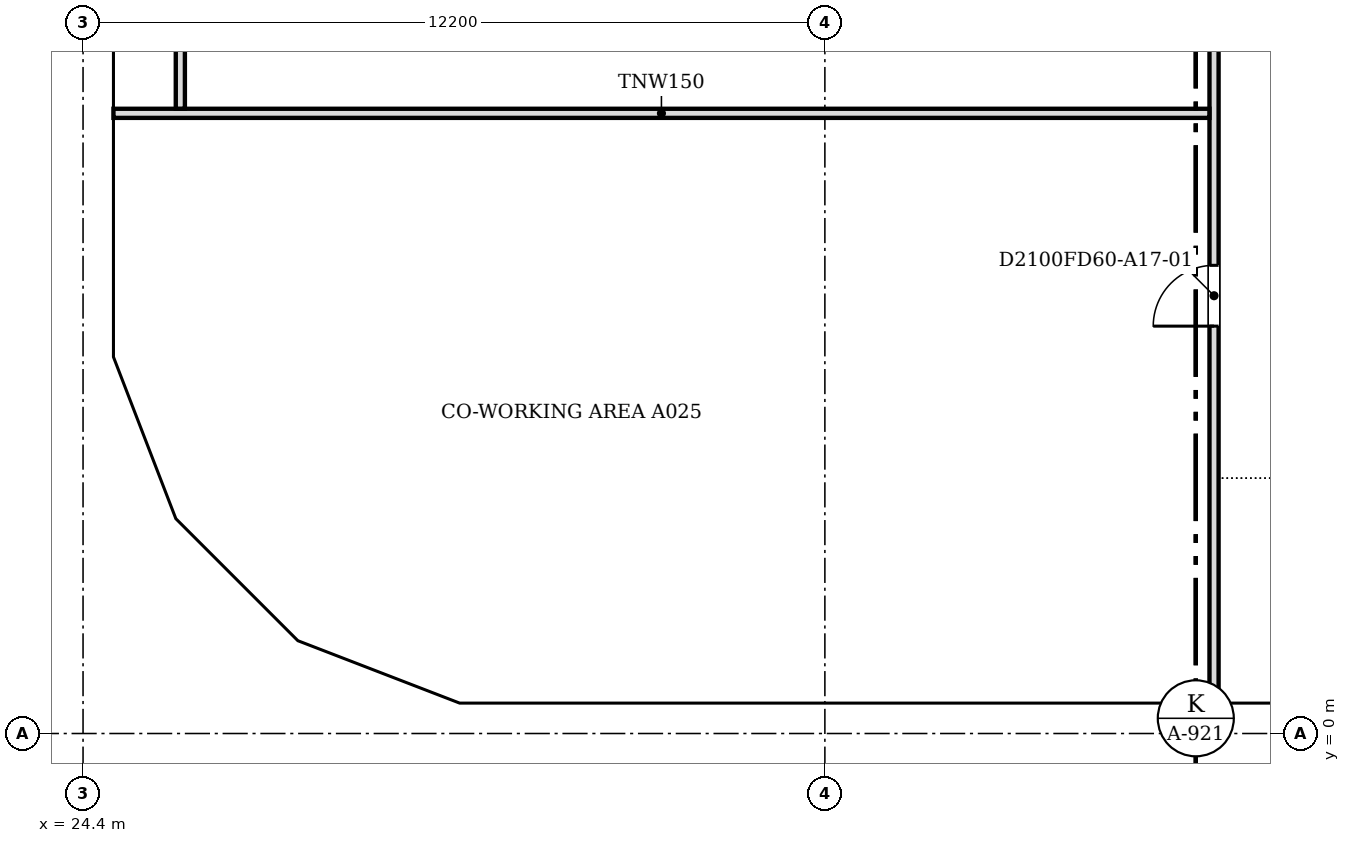
"""IFC4 building model, lengths in metres.
Left out: names, types, materials, properties, quantities, classifications, styles, units other than length and angle.
Written with IfcOpenShell. Run it as: python <this file> out.ifc"""

import sys

from ifc_helpers import new_model, si_unit, direction, frame, frame_2d, origin, place, context, subcontext, project, spatial, polyline, rectangle, outline, extrude, faceted_brep, source, transform, mapped, element, fill, save


model = new_model("IFC4")
c1 = context("Model", 3, precision=1e-05, world=origin(), true_north=direction((0.0, 1.0)))
c2 = subcontext(c1, "Body", "Model", "MODEL_VIEW")
j1 = project(units=[si_unit("LENGTHUNIT", "METRE"), si_unit("PLANEANGLEUNIT", "RADIAN")], contexts=[c1])
p1 = place(None, origin())
s1 = spatial("IfcSite", under=j1, at=p1, CompositionType="ELEMENT")
p2 = place(p1, origin())
s2 = spatial("IfcBuilding", under=s1, at=p2, CompositionType="ELEMENT")
p3 = place(p2, frame((0.0, 0.0, 189.6)))
s3 = spatial("IfcBuildingStorey", under=s2, at=p3, CompositionType="ELEMENT", Elevation=189.6)
m1 = source(origin(), c2, "Body", "Brep", [
    faceted_brep([(3.003, -0.25, 0.0), (6.053, -0.25, 3.8), (3.003, -0.25, 7.6), (0.0, -0.25, 3.8), (0.047, 0.25, 3.859), (3.003, 0.25, 7.6), (6.053, 0.25, 3.8), (3.003, 0.25, 0.0), (0.047, 0.25, 3.741), (0.0, 0.0, 3.8)], [[[0, 1, 2, 3]], [[4, 5, 6, 7, 8]], [[7, 6, 1, 0]], [[6, 5, 2, 1]], [[5, 4, 9, 3, 2]], [[8, 7, 0, 3, 9]], [[8, 9, 4]]]),
])
p4 = place(p3, frame((30.547, 0.25, -3.8), z_axis=(0.0, 0.0, 1.0), x_axis=(1.0, 0.0, 0.0)))
e1 = element("IfcWall", 1, at=p4, inside=s3, PredefinedType="SOLIDWALL", context=c2, shape_type="MappedRepresentation", body=[
    mapped(m1, transform((0.0, 0.0, 0.0), scale=1.0)),
])
m2 = source(origin(), c2, "Body", "SweptSolid", [
    extrude(outline(polyline([(3.005, 0.401), (5.733, 3.8), (3.005, 7.199), (0.319, 3.8), (3.005, 0.401)])), frame((0.0, 0.26, 0.0), z_axis=(0.0, -1.0, 0.0), x_axis=(1.0, 0.0, 0.0)), (0.0, 0.0, 1.0), 0.52),
])
p5 = place(p4, origin())
e2 = element("IfcOpeningElement", 2, at=p5, cuts=e1, PredefinedType="OPENING", context=c2, shape_type="MappedRepresentation", body=[
    mapped(m2, transform((0.0, 0.0, 0.0), scale=1.0)),
])
m3 = source(origin(), c2, "Body", "Brep", [
    faceted_brep([(3.05, -0.25, 0.0), (6.1, -0.25, 3.8), (6.1, -0.25, 3.8), (3.05, -0.25, 7.6), (0.0, -0.25, 3.8), (0.0, 0.25, 3.8), (3.05, 0.25, 7.6), (6.1, 0.25, 3.8), (6.1, 0.25, 3.8), (3.05, 0.25, 0.0)], [[[0, 1, 2, 3, 4]], [[5, 6, 7, 8, 9]], [[9, 8, 1, 0]], [[7, 6, 3, 2]], [[6, 5, 4, 3]], [[5, 9, 0, 4]], [[1, 8, 7, 2]]]),
])
p6 = place(p3, frame((36.6, 0.25, -3.8), z_axis=(0.0, 0.0, 1.0), x_axis=(1.0, 0.0, 0.0)))
e3 = element("IfcWall", 3, at=p6, inside=s3, PredefinedType="SOLIDWALL", context=c2, shape_type="MappedRepresentation", body=[
    mapped(m3, transform((0.0, 0.0, 0.0), scale=1.0)),
])
m4 = source(origin(), c2, "Body", "SweptSolid", [
    extrude(outline(polyline([(3.05, 0.399), (5.78, 3.8), (3.05, 7.2), (0.321, 3.8), (3.05, 0.399)])), frame((0.0, 0.26, 0.0), z_axis=(0.0, -1.0, 0.0), x_axis=(1.0, 0.0, 0.0)), (0.0, 0.0, 1.0), 0.52),
])
p7 = place(p6, origin())
e4 = element("IfcOpeningElement", 4, at=p7, cuts=e3, PredefinedType="OPENING", context=c2, shape_type="MappedRepresentation", body=[
    mapped(m4, transform((0.0, 0.0, 0.0), scale=1.0)),
])
m5 = source(origin(), c2, "Body", "SweptSolid", [
    extrude(outline(polyline([(3.05, 0.0), (6.1, 3.8), (3.05, 7.6), (0.0, 3.8), (3.05, 0.0)])), frame((0.0, 0.25, 0.0), z_axis=(0.0, -1.0, 0.0), x_axis=(1.0, 0.0, 0.0)), (0.0, 0.0, 1.0), 0.5),
])
p8 = place(p3, frame((42.7, 0.25, -3.8), z_axis=(0.0, 0.0, 1.0), x_axis=(1.0, 0.0, 0.0)))
e5 = element("IfcWall", 5, at=p8, inside=s3, PredefinedType="SOLIDWALL", context=c2, shape_type="MappedRepresentation", body=[
    mapped(m5, transform((0.0, 0.0, 0.0), scale=1.0)),
])
p9 = place(p8, origin())
e6 = element("IfcOpeningElement", 6, at=p9, cuts=e5, PredefinedType="OPENING", context=c2, shape_type="MappedRepresentation", body=[
    mapped(m4, transform((0.0, 0.0, 0.0), scale=1.0)),
])
m6 = source(origin(), c2, "Body", "Brep", [
    faceted_brep([(0.093, -0.25, 0.057), (3.143, -0.25, 3.8), (0.093, -0.25, 7.543), (0.0, 0.25, 7.544), (0.047, 0.25, 7.6), (3.143, 0.25, 3.8), (0.047, 0.25, 0.0), (0.0, 0.25, 0.056), (0.047, 0.0, 0.0), (0.047, 0.0, 7.6)], [[[0, 1, 2]], [[3, 4, 5, 6, 7]], [[6, 5, 1, 0, 8]], [[5, 4, 9, 2, 1]], [[4, 3, 9]], [[7, 6, 8]], [[7, 8, 0, 2, 9, 3]]]),
])
p10 = place(p3, frame((24.65, 12.293, -3.8), z_axis=(0.0, 0.0, 1.0), x_axis=(0.0, -1.0, 0.0)))
e7 = element("IfcWall", 7, at=p10, inside=s3, PredefinedType="SOLIDWALL", context=c2, shape_type="MappedRepresentation", body=[
    mapped(m6, transform((0.0, 0.0, 0.0), scale=1.0)),
])
m7 = source(origin(), c2, "Body", "SweptSolid", [
    extrude(outline(polyline([(0.247, 0.641), (2.821, 3.8), (0.247, 6.959), (0.247, 0.641)])), frame((0.0, 0.26, 0.0), z_axis=(0.0, -1.0, 0.0), x_axis=(1.0, 0.0, 0.0)), (0.0, 0.0, 1.0), 0.52),
])
p11 = place(p10, origin())
e8 = element("IfcOpeningElement", 8, at=p11, cuts=e7, PredefinedType="OPENING", context=c2, shape_type="MappedRepresentation", body=[
    mapped(m7, transform((0.0, 0.0, 0.0), scale=1.0)),
])
m8 = source(origin(), c2, "Body", "Brep", [
    faceted_brep([(3.003, -0.25, 0.0), (3.05, -0.25, 0.06), (3.05, -0.25, 7.54), (3.003, -0.25, 7.6), (0.0, -0.25, 3.8), (0.0, 0.25, 3.8), (2.957, 0.25, 7.541), (2.957, 0.25, 0.059), (3.003, 0.0, 0.0), (3.003, 0.0, 7.6)], [[[0, 1, 2, 3, 4]], [[5, 6, 7]], [[1, 0, 8]], [[9, 3, 2]], [[6, 5, 4, 3, 9]], [[5, 7, 8, 0, 4]], [[1, 8, 7, 6, 9, 2]]]),
])
p12 = place(p3, frame((24.65, 9.15, -3.8), z_axis=(0.0, 0.0, 1.0), x_axis=(0.0, -1.0, 0.0)))
e9 = element("IfcWall", 9, at=p12, inside=s3, PredefinedType="SOLIDWALL", context=c2, shape_type="MappedRepresentation", body=[
    mapped(m8, transform((0.0, 0.0, 0.0), scale=1.0)),
])
m9 = source(origin(), c2, "Body", "SweptSolid", [
    extrude(outline(polyline([(2.803, 6.944), (0.319, 3.8), (2.803, 0.656), (2.803, 6.944)])), frame((0.0, 0.26, 0.0), z_axis=(0.0, -1.0, 0.0), x_axis=(1.0, 0.0, 0.0)), (0.0, 0.0, 1.0), 0.52),
])
p13 = place(p12, origin())
e10 = element("IfcOpeningElement", 10, at=p13, cuts=e9, PredefinedType="OPENING", context=c2, shape_type="MappedRepresentation", body=[
    mapped(m9, transform((0.0, 0.0, 0.0), scale=1.0)),
])
m10 = source(origin(), c2, "Body", "Brep", [
    faceted_brep([(0.047, -0.25, 0.0), (2.997, -0.25, 3.8), (0.047, -0.25, 7.6), (0.0, -0.25, 7.541), (0.0, -0.25, 0.059), (0.093, 0.25, 7.54), (2.944, 0.25, 3.868), (2.944, 0.25, 3.732), (0.093, 0.25, 0.06), (2.997, 0.0, 3.8), (0.047, 0.0, 0.0), (0.047, 0.0, 7.6)], [[[0, 1, 2, 3, 4]], [[5, 6, 7, 8]], [[8, 7, 9, 1, 0, 10]], [[6, 5, 11, 2, 1, 9]], [[3, 2, 11]], [[10, 0, 4]], [[8, 10, 4, 3, 11, 5]], [[7, 6, 9]]]),
])
p14 = place(p3, frame((24.633, 6.19, -3.8), z_axis=(0.0, 0.0, 1.0), x_axis=(0.359901446078, -0.932990326376, 0.0)))
e11 = element("IfcWall", 11, at=p14, inside=s3, PredefinedType="SOLIDWALL", context=c2, shape_type="MappedRepresentation", body=[
    mapped(m10, transform((0.0, 0.0, 0.0), scale=1.0)),
])
m11 = source(origin(), c2, "Body", "SweptSolid", [
    extrude(outline(polyline([(0.247, 0.665), (2.681, 3.8), (0.247, 6.935), (0.247, 0.665)])), frame((0.0, 0.26, 0.0), z_axis=(0.0, -1.0, 0.0), x_axis=(1.0, 0.0, 0.0)), (0.0, 0.0, 1.0), 0.52),
])
p15 = place(p14, origin())
e12 = element("IfcOpeningElement", 12, at=p15, cuts=e11, PredefinedType="OPENING", context=c2, shape_type="MappedRepresentation", body=[
    mapped(m11, transform((0.0, 0.0, 0.0), scale=1.0)),
])
m12 = source(origin(), c2, "Body", "Brep", [
    faceted_brep([(2.944, -0.25, 0.0), (2.997, -0.25, 0.068), (2.997, -0.25, 7.532), (2.944, -0.25, 7.6), (0.0, -0.25, 3.8), (0.053, 0.25, 3.868), (2.891, 0.25, 7.532), (2.891, 0.25, 0.068), (0.053, 0.25, 3.732), (2.944, 0.0, 0.0), (2.944, 0.0, 7.6), (0.0, 0.0, 3.8)], [[[0, 1, 2, 3, 4]], [[5, 6, 7, 8]], [[1, 0, 9]], [[10, 3, 2]], [[6, 5, 11, 4, 3, 10]], [[8, 7, 9, 0, 4, 11]], [[8, 11, 5]], [[1, 9, 7, 6, 10, 2]]]),
])
p16 = place(p3, frame((25.712, 3.394, -3.8), z_axis=(0.0, 0.0, 1.0), x_axis=(0.707066050402, -0.707147509625, 0.0)))
e13 = element("IfcWall", 13, at=p16, inside=s3, PredefinedType="SOLIDWALL", context=c2, shape_type="MappedRepresentation", body=[
    mapped(m12, transform((0.0, 0.0, 0.0), scale=1.0)),
])
m13 = source(origin(), c2, "Body", "SweptSolid", [
    extrude(outline(polyline([(2.744, 6.934), (0.316, 3.8), (2.744, 0.666), (2.744, 6.934)])), frame((0.0, 0.26, 0.0), z_axis=(0.0, -1.0, 0.0), x_axis=(1.0, 0.0, 0.0)), (0.0, 0.0, 1.0), 0.52),
])
p17 = place(p16, origin())
e14 = element("IfcOpeningElement", 14, at=p17, cuts=e13, PredefinedType="OPENING", context=c2, shape_type="MappedRepresentation", body=[
    mapped(m13, transform((0.0, 0.0, 0.0), scale=1.0)),
])
m14 = source(origin(), c2, "Body", "Brep", [
    faceted_brep([(0.053, -0.25, 0.0), (3.003, -0.25, 3.8), (0.053, -0.25, 7.6), (0.0, -0.25, 7.531), (0.0, -0.25, 0.068), (0.106, 0.25, 7.532), (2.957, 0.25, 3.86), (2.957, 0.25, 3.74), (0.106, 0.25, 0.068), (3.003, 0.0, 3.8), (0.053, 0.0, 0.0), (0.053, 0.0, 7.6)], [[[0, 1, 2, 3, 4]], [[5, 6, 7, 8]], [[8, 7, 9, 1, 0, 10]], [[6, 5, 11, 2, 1, 9]], [[3, 2, 11]], [[10, 0, 4]], [[8, 10, 4, 3, 11, 5]], [[7, 6, 9]]]),
])
p18 = place(p3, frame((27.744, 1.331, -3.8), z_axis=(0.0, 0.0, 1.0), x_axis=(0.932970071518, -0.359953949349, 0.0)))
e15 = element("IfcWall", 15, at=p18, inside=s3, PredefinedType="SOLIDWALL", context=c2, shape_type="MappedRepresentation", body=[
    mapped(m14, transform((0.0, 0.0, 0.0), scale=1.0)),
])
m15 = source(origin(), c2, "Body", "SweptSolid", [
    extrude(outline(polyline([(0.253, 0.665), (2.687, 3.8), (0.253, 6.935), (0.253, 0.665)])), frame((0.0, 0.26, 0.0), z_axis=(0.0, -1.0, 0.0), x_axis=(1.0, 0.0, 0.0)), (0.0, 0.0, 1.0), 0.52),
])
p19 = place(p18, origin())
e16 = element("IfcOpeningElement", 16, at=p19, cuts=e15, PredefinedType="OPENING", context=c2, shape_type="MappedRepresentation", body=[
    mapped(m15, transform((0.0, 0.0, 0.0), scale=1.0)),
])
m16 = source(origin(), c2, "Body", "Brep", [
    faceted_brep([(0.047, -0.25, 0.0), (3.05, -0.25, 3.8), (0.0, -0.25, 3.8), (0.0, -0.25, 0.06), (0.093, 0.25, 3.8), (3.05, 0.25, 3.8), (0.093, 0.25, 0.059), (0.047, 0.0, 0.0)], [[[0, 1, 2, 3]], [[4, 5, 6]], [[6, 5, 1, 0, 7]], [[5, 4, 2, 1]], [[7, 0, 3]], [[6, 7, 3, 2, 4]]]),
])
p20 = place(p3, frame((30.5, 0.25, 0.0), z_axis=(0.0, 0.0, 1.0), x_axis=(1.0, 0.0, 0.0)))
e17 = element("IfcWall", 17, at=p20, inside=s3, PredefinedType="SOLIDWALL", context=c2, shape_type="MappedRepresentation", body=[
    mapped(m16, transform((0.0, 0.0, 0.0), scale=1.0)),
])
m17 = source(origin(), c2, "Body", "SweptSolid", [
    extrude(outline(polyline([(0.247, 0.656), (2.534, 3.55), (0.247, 3.55), (0.247, 0.656)])), frame((0.0, 0.26, 0.0), z_axis=(0.0, -1.0, 0.0), x_axis=(1.0, 0.0, 0.0)), (0.0, 0.0, 1.0), 0.52),
])
p21 = place(p20, origin())
e18 = element("IfcOpeningElement", 18, at=p21, cuts=e17, PredefinedType="OPENING", context=c2, shape_type="MappedRepresentation", body=[
    mapped(m17, transform((0.0, 0.0, 0.0), scale=1.0)),
])
m18 = source(origin(), c2, "Body", "Brep", [
    faceted_brep([(2.95, -0.25, 0.0), (2.997, -0.25, 0.059), (2.997, -0.25, 3.8), (0.0, -0.25, 3.8), (0.053, 0.25, 3.8), (2.904, 0.25, 3.8), (2.904, 0.25, 0.06), (0.053, 0.25, 3.732), (2.95, 0.0, 0.0), (0.0, 0.0, 3.8)], [[[0, 1, 2, 3]], [[4, 5, 6, 7]], [[1, 0, 8]], [[5, 4, 9, 3, 2]], [[7, 6, 8, 0, 3, 9]], [[7, 9, 4]], [[1, 8, 6, 5, 2]]]),
])
p22 = place(p3, frame((27.794, 1.312, 0.0), z_axis=(0.0, 0.0, 1.0), x_axis=(0.932973525033, -0.359944998003, 0.0)))
e19 = element("IfcWall", 19, at=p22, inside=s3, PredefinedType="SOLIDWALL", context=c2, shape_type="MappedRepresentation", body=[
    mapped(m18, transform((0.0, 0.0, 0.0), scale=1.0)),
])
m19 = source(origin(), c2, "Body", "SweptSolid", [
    extrude(outline(polyline([(2.75, 3.55), (0.511, 3.55), (2.75, 0.665), (2.75, 3.55)])), frame((0.0, 0.26, 0.0), z_axis=(0.0, -1.0, 0.0), x_axis=(1.0, 0.0, 0.0)), (0.0, 0.0, 1.0), 0.52),
])
p23 = place(p22, origin())
e20 = element("IfcOpeningElement", 20, at=p23, cuts=e19, PredefinedType="OPENING", context=c2, shape_type="MappedRepresentation", body=[
    mapped(m19, transform((0.0, 0.0, 0.0), scale=1.0)),
])
m20 = source(origin(), c2, "Body", "Brep", [
    faceted_brep([(3.05, -0.25, 0.0), (6.1, -0.25, 3.8), (6.1, -0.25, 3.8), (0.0, -0.25, 3.8), (0.0, 0.25, 3.8), (6.1, 0.25, 3.8), (6.1, 0.25, 3.8), (3.05, 0.25, 0.0)], [[[0, 1, 2, 3]], [[4, 5, 6, 7]], [[7, 6, 1, 0]], [[5, 4, 3, 2]], [[4, 7, 0, 3]], [[1, 6, 5, 2]]]),
])
p24 = place(p3, frame((33.55, 0.25, 0.0), z_axis=(0.0, 0.0, 1.0), x_axis=(1.0, 0.0, 0.0)))
e21 = element("IfcWall", 21, at=p24, inside=s3, PredefinedType="SOLIDWALL", context=c2, shape_type="MappedRepresentation", body=[
    mapped(m20, transform((0.0, 0.0, 0.0), scale=1.0)),
])
m21 = source(origin(), c2, "Body", "SweptSolid", [
    extrude(outline(polyline([(3.05, 0.399), (5.579, 3.55), (0.521, 3.55), (3.05, 0.399)])), frame((0.0, 0.26, 0.0), z_axis=(0.0, -1.0, 0.0), x_axis=(1.0, 0.0, 0.0)), (0.0, 0.0, 1.0), 0.52),
])
p25 = place(p24, origin())
e22 = element("IfcOpeningElement", 22, at=p25, cuts=e21, PredefinedType="OPENING", context=c2, shape_type="MappedRepresentation", body=[
    mapped(m21, transform((0.0, 0.0, 0.0), scale=1.0)),
])
m22 = source(origin(), c2, "Body", "SweptSolid", [
    extrude(outline(polyline([(3.05, 0.0), (6.1, 3.8), (0.0, 3.8), (3.05, 0.0)])), frame((0.0, 0.25, 0.0), z_axis=(0.0, -1.0, 0.0), x_axis=(1.0, 0.0, 0.0)), (0.0, 0.0, 1.0), 0.5),
])
p26 = place(p3, frame((39.65, 0.25, 0.0), z_axis=(0.0, 0.0, 1.0), x_axis=(1.0, 0.0, 0.0)))
e23 = element("IfcWall", 23, at=p26, inside=s3, PredefinedType="SOLIDWALL", context=c2, shape_type="MappedRepresentation", body=[
    mapped(m22, transform((0.0, 0.0, 0.0), scale=1.0)),
])
p27 = place(p26, origin())
e24 = element("IfcOpeningElement", 24, at=p27, cuts=e23, PredefinedType="OPENING", context=c2, shape_type="MappedRepresentation", body=[
    mapped(m21, transform((0.0, 0.0, 0.0), scale=1.0)),
])
m23 = source(origin(), c2, "Body", "Brep", [
    faceted_brep([(3.096, -0.25, 0.0), (6.1, -0.25, 3.8), (0.047, -0.25, 3.8), (0.047, -0.25, 3.743), (0.0, 0.25, 3.8), (6.053, 0.25, 3.8), (6.053, 0.25, 3.741), (3.096, 0.25, 0.0), (6.1, -0.0, 3.8), (0.0, 0.0, 3.8)], [[[0, 1, 2, 3]], [[4, 5, 6, 7]], [[7, 6, 8, 1, 0]], [[5, 4, 9, 2, 1, 8]], [[4, 7, 0, 3, 9]], [[3, 2, 9]], [[6, 5, 8]]]),
])
p28 = place(p3, frame((24.65, 12.247, 0.0), z_axis=(0.0, 0.0, 1.0), x_axis=(0.0, -1.0, 0.0)))
e25 = element("IfcWall", 25, at=p28, inside=s3, PredefinedType="SOLIDWALL", context=c2, shape_type="MappedRepresentation", body=[
    mapped(m23, transform((0.0, 0.0, 0.0), scale=1.0)),
])
m24 = source(origin(), c2, "Body", "SweptSolid", [
    extrude(outline(polyline([(3.094, 0.399), (5.584, 3.55), (0.526, 3.55), (3.094, 0.399)])), frame((0.0, 0.26, 0.0), z_axis=(0.0, -1.0, 0.0), x_axis=(1.0, 0.0, 0.0)), (0.0, 0.0, 1.0), 0.52),
])
p29 = place(p28, origin())
e26 = element("IfcOpeningElement", 26, at=p29, cuts=e25, PredefinedType="OPENING", context=c2, shape_type="MappedRepresentation", body=[
    mapped(m24, transform((0.0, 0.0, 0.0), scale=1.0)),
])
m25 = source(origin(), c2, "Body", "Brep", [
    faceted_brep([(2.95, -0.25, 0.0), (3.003, -0.25, 0.068), (3.003, -0.25, 3.8), (0.0, -0.25, 3.8), (0.047, 0.25, 3.8), (2.898, 0.25, 3.8), (2.898, 0.25, 0.068), (0.047, 0.25, 3.74), (2.95, 0.0, 0.0), (0.0, 0.0, 3.8)], [[[0, 1, 2, 3]], [[4, 5, 6, 7]], [[1, 0, 8]], [[5, 4, 9, 3, 2]], [[7, 6, 8, 0, 3, 9]], [[7, 9, 4]], [[1, 8, 6, 5, 2]]]),
])
p30 = place(p3, frame((24.65, 6.146, 0.0), z_axis=(0.0, 0.0, 1.0), x_axis=(0.359953949349, -0.932970071518, 0.0)))
e27 = element("IfcWall", 27, at=p30, inside=s3, PredefinedType="SOLIDWALL", context=c2, shape_type="MappedRepresentation", body=[
    mapped(m25, transform((0.0, 0.0, 0.0), scale=1.0)),
])
p31 = place(p30, origin())
e28 = element("IfcOpeningElement", 28, at=p31, cuts=e27, PredefinedType="OPENING", context=c2, shape_type="MappedRepresentation", body=[
    mapped(m19, transform((0.0, 0.0, 0.0), scale=1.0)),
])
m26 = source(origin(), c2, "Body", "Brep", [
    faceted_brep([(0.053, -0.25, 0.0), (2.997, -0.25, 3.8), (0.0, -0.25, 3.8), (0.0, -0.25, 0.068), (0.106, 0.25, 3.8), (2.944, 0.25, 3.8), (2.944, 0.25, 3.732), (0.106, 0.25, 0.068), (2.997, 0.0, 3.8), (0.053, 0.0, 0.0)], [[[0, 1, 2, 3]], [[4, 5, 6, 7]], [[7, 6, 8, 1, 0, 9]], [[5, 4, 2, 1, 8]], [[9, 0, 3]], [[7, 9, 3, 2, 4]], [[6, 5, 8]]]),
])
p32 = place(p3, frame((25.675, 3.431, 0.0), z_axis=(0.0, 0.0, 1.0), x_axis=(0.707106781187, -0.707106781187, 0.0)))
e29 = element("IfcWall", 29, at=p32, inside=s3, PredefinedType="SOLIDWALL", context=c2, shape_type="MappedRepresentation", body=[
    mapped(m26, transform((0.0, 0.0, 0.0), scale=1.0)),
])
m27 = source(origin(), c2, "Body", "SweptSolid", [
    extrude(outline(polyline([(0.253, 0.666), (2.487, 3.55), (0.253, 3.55), (0.253, 0.666)])), frame((0.0, 0.26, 0.0), z_axis=(0.0, -1.0, 0.0), x_axis=(1.0, 0.0, 0.0)), (0.0, 0.0, 1.0), 0.52),
])
p33 = place(p32, origin())
e30 = element("IfcOpeningElement", 30, at=p33, cuts=e29, PredefinedType="OPENING", context=c2, shape_type="MappedRepresentation", body=[
    mapped(m27, transform((0.0, 0.0, 0.0), scale=1.0)),
])
p34 = place(p3, frame((43.0, 0.5, 0.0), z_axis=(0.0, 0.0, 1.0), x_axis=(0.0, 1.0, 0.0)))
e31 = element("IfcWall", 31, at=p34, inside=s3, PredefinedType="PARTITIONING", context=c2, shape_type="SweptSolid", body=[
    extrude(rectangle(XDim=21.424, YDim=0.15, at=frame_2d((10.712, 0.0))), origin(), (0.0, 0.0, 1.0), 2.947),
])
m28 = source(origin(), c2, "Body", "SweptSolid", [
    extrude(rectangle(XDim=1.0, YDim=2.1, at=frame_2d((0.5, 1.05))), frame((0.0, 0.085, 0.0), z_axis=(0.0, -1.0, 0.0), x_axis=(1.0, 0.0, 0.0)), (0.0, 0.0, 1.0), 0.17),
])
p35 = place(p34, frame((6.2, 0.0, 0.0)))
e32 = element("IfcOpeningElement", 32, at=p35, cuts=e31, PredefinedType="OPENING", context=c2, shape_type="MappedRepresentation", body=[
    mapped(m28, transform((0.0, 0.0, 0.0), scale=1.0)),
])
p36 = place(p34, frame((15.1, 0.0, 0.0)))
e33 = element("IfcOpeningElement", 33, at=p36, cuts=e31, PredefinedType="OPENING", context=c2, shape_type="MappedRepresentation", body=[
    mapped(m28, transform((0.0, 0.0, 0.0), scale=1.0)),
])
p37 = place(p3, frame((24.9, 10.2, 0.0), z_axis=(0.0, 0.0, 1.0), x_axis=(1.0, 0.0, 0.0)))
e34 = element("IfcWall", 34, at=p37, inside=s3, PredefinedType="PARTITIONING", context=c2, shape_type="SweptSolid", body=[
    extrude(rectangle(XDim=18.024, YDim=0.15, at=frame_2d((9.012, 0.0))), origin(), (0.0, 0.0, 1.0), 2.947),
])
p38 = place(p3, frame((26.0, 10.276, 0.0), z_axis=(0.0, 0.0, 1.0), x_axis=(0.0, 1.0, 0.0)))
e35 = element("IfcWall", 35, at=p38, inside=s3, PredefinedType="PARTITIONING", context=c2, shape_type="SweptSolid", body=[
    extrude(rectangle(XDim=8.524, YDim=0.15, at=frame_2d((4.262, 0.0))), origin(), (0.0, 0.0, 1.0), 2.947),
])
m29 = source(origin(), c2, "Body", "SweptSolid", [
    extrude(rectangle(XDim=0.9, YDim=2.1, at=frame_2d((0.45, 1.05))), frame((0.0, 0.085, 0.0), z_axis=(0.0, -1.0, 0.0), x_axis=(1.0, 0.0, 0.0)), (0.0, 0.0, 1.0), 0.17),
])
p39 = place(p38, frame((1.6, 0.0, 0.0)))
e36 = element("IfcOpeningElement", 36, at=p39, cuts=e35, PredefinedType="OPENING", context=c2, shape_type="MappedRepresentation", body=[
    mapped(m29, transform((0.0, 0.0, 0.0), scale=1.0)),
])
p40 = place(p38, frame((5.879, 0.0, 0.0)))
e37 = element("IfcOpeningElement", 37, at=p40, cuts=e35, PredefinedType="OPENING", context=c2, shape_type="MappedRepresentation", body=[
    mapped(m29, transform((0.0, 0.0, 0.0), scale=1.0)),
])
m30 = source(origin(), c2, "Body", "SweptSolid", [
    extrude(rectangle(XDim=1.0, YDim=2.1, at=frame_2d((0.5, 1.05))), frame((0.0, 0.025, 0.0), z_axis=(0.0, -1.0, 0.0), x_axis=(1.0, 0.0, 0.0)), (0.0, 0.0, 1.0), 0.05),
])
p41 = place(p35, origin())
e38 = element("IfcDoor", 38, at=p41, inside=s3, OperationType="SINGLE_SWING_LEFT", PredefinedType="DOOR", context=c2, shape_type="MappedRepresentation", body=[
    mapped(m30, transform((0.0, 0.0, 0.0), scale=1.0)),
])
fill(e32, e38)
save(model, sys.argv[1])
